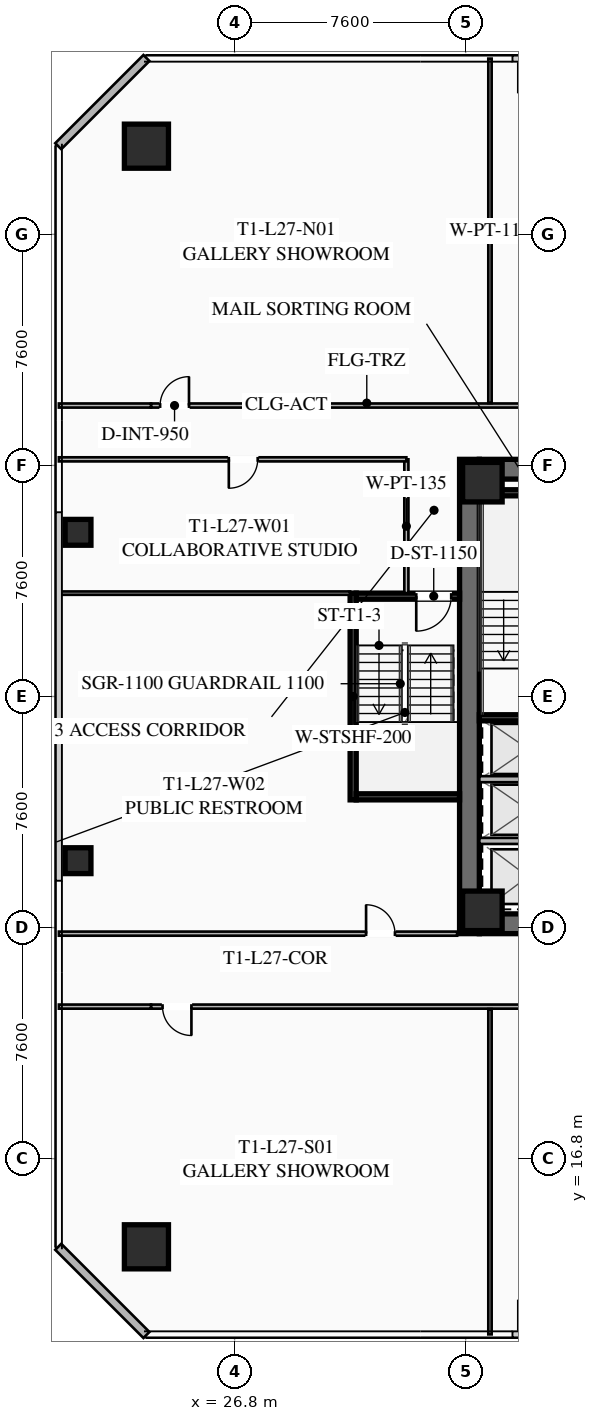
"""IFC4 building model, lengths in metres.
Left out: names, types, materials, properties, quantities, classifications, styles, units other than length and angle.
Written with IfcOpenShell. Run it as: python <this file> out.ifc"""

import sys

from ifc_helpers import new_model, si_unit, direction, frame, frame_2d, origin, origin_2d, place, context, subcontext, project, spatial, rectangle, hollow_rectangle, extrude, element, fill, save


model = new_model("IFC4")
c1 = context("Model", 3, precision=1e-05, world=origin(), true_north=direction((0.0, 1.0)))
c2 = subcontext(c1, "Body", "Model", "MODEL_VIEW")
j1 = project(units=[si_unit("LENGTHUNIT", "METRE"), si_unit("PLANEANGLEUNIT", "RADIAN")], contexts=[c1])
p1 = place(None, origin())
s1 = spatial("IfcSite", under=j1, at=p1, CompositionType="ELEMENT")
p2 = place(p1, origin())
s2 = spatial("IfcBuilding", under=s1, at=p2, CompositionType="ELEMENT")
p3 = place(p2, frame((0.0, 0.0, 102.7)))
s3 = spatial("IfcBuildingStorey", under=s2, at=p3, CompositionType="ELEMENT", Elevation=102.7)
p4 = place(p3, frame((34.525, 24.2, 0.0), z_axis=(0.0, 0.0, 1.0), x_axis=(0.0, 1.0, 0.0)))
e1 = element("IfcWall", 1, at=p4, inside=s3, PredefinedType="SHEAR", context=c2, shape_type="SweptSolid", body=[
    extrude(rectangle(XDim=15.6, YDim=0.65, at=frame_2d((7.8, 0.0))), origin(), (0.0, 0.0, 1.0), 3.55),
])
p5 = place(p3, frame((49.15, 24.525, 0.0), z_axis=(0.0, 0.0, 1.0), x_axis=(-1.0, 0.0, 0.0)))
e2 = element("IfcWall", 2, at=p5, inside=s3, PredefinedType="SHEAR", context=c2, shape_type="SweptSolid", body=[
    extrude(rectangle(XDim=14.3, YDim=0.65, at=frame_2d((7.15, 0.0))), origin(), (0.0, 0.0, 1.0), 3.55),
])
p6 = place(p5, frame((8.85, 0.0, 0.0)))
e3 = element("IfcOpeningElement", 3, at=p6, cuts=e2, PredefinedType="OPENING", context=c2, shape_type="SweptSolid", body=[
    extrude(rectangle(XDim=1.25, YDim=2.25, at=frame_2d((0.625, 1.125))), frame((0.0, 0.335, 0.0), z_axis=(0.0, -1.0, 0.0), x_axis=(1.0, 0.0, 0.0)), (0.0, 0.0, 1.0), 0.67),
])
p7 = place(p5, frame((3.8, 0.0, 0.0)))
e4 = element("IfcOpeningElement", 4, at=p7, cuts=e2, PredefinedType="OPENING", context=c2, shape_type="SweptSolid", body=[
    extrude(rectangle(XDim=1.25, YDim=2.25, at=frame_2d((0.625, 1.125))), frame((0.0, 0.335, 0.0), z_axis=(0.0, -1.0, 0.0), x_axis=(1.0, 0.0, 0.0)), (0.0, 0.0, 1.0), 0.67),
])
p8 = place(p3, frame((34.85, 39.475, 0.0), z_axis=(0.0, 0.0, 1.0), x_axis=(1.0, 0.0, 0.0)))
e5 = element("IfcWall", 5, at=p8, inside=s3, PredefinedType="SHEAR", context=c2, shape_type="SweptSolid", body=[
    extrude(rectangle(XDim=14.3, YDim=0.65, at=frame_2d((7.15, 0.0))), origin(), (0.0, 0.0, 1.0), 3.55),
])
p9 = place(p8, frame((4.2, 0.0, 0.0)))
e6 = element("IfcOpeningElement", 6, at=p9, cuts=e5, PredefinedType="OPENING", context=c2, shape_type="SweptSolid", body=[
    extrude(rectangle(XDim=1.25, YDim=2.25, at=frame_2d((0.625, 1.125))), frame((0.0, 0.335, 0.0), z_axis=(0.0, -1.0, 0.0), x_axis=(1.0, 0.0, 0.0)), (0.0, 0.0, 1.0), 0.67),
])
p10 = place(p8, frame((9.25, 0.0, 0.0)))
e7 = element("IfcOpeningElement", 7, at=p10, cuts=e5, PredefinedType="OPENING", context=c2, shape_type="SweptSolid", body=[
    extrude(rectangle(XDim=1.25, YDim=2.25, at=frame_2d((0.625, 1.125))), frame((0.0, 0.335, 0.0), z_axis=(0.0, -1.0, 0.0), x_axis=(1.0, 0.0, 0.0)), (0.0, 0.0, 1.0), 0.67),
])
for number, where, z_axis, x_axis in (
    (8, (34.95, 24.95, 0.0), (0.0, 0.0, 1.0), (1.0, 0.0, 0.0)),
    (9, (34.95, 39.05, 0.0), (0.0, 0.0, 1.0), (1.0, 0.0, 0.0)),
):
    element("IfcColumn", number, at=place(p3, frame(where, z_axis=z_axis, x_axis=x_axis)), inside=s3, PredefinedType="COLUMN", context=c2, shape_type="SweptSolid", body=[
        extrude(hollow_rectangle(XDim=1.3, YDim=1.3, WallThickness=0.05, at=origin_2d()), origin(), (0.0, 0.0, 1.0), 3.35),
    ])
for number, where, z_axis, x_axis in (
    (10, (23.9, 13.9, 0.0), (0.0, 0.0, 1.0), (1.0, 0.0, 0.0)),
    (11, (23.9, 50.1, 0.0), (0.0, 0.0, 1.0), (1.0, 0.0, 0.0)),
):
    element("IfcColumn", number, at=place(p3, frame(where, z_axis=z_axis, x_axis=x_axis)), inside=s3, PredefinedType="COLUMN", context=c2, shape_type="SweptSolid", body=[
        extrude(hollow_rectangle(XDim=1.45, YDim=1.45, WallThickness=0.055, at=origin_2d()), origin(), (0.0, 0.0, 1.0), 3.35),
    ])
for number, where, z_axis, x_axis in (
    (12, (21.65, 37.4, 0.0), (0.0, 0.0, 1.0), (1.0, 0.0, 0.0)),
    (13, (21.65, 26.6, 0.0), (0.0, 0.0, 1.0), (1.0, 0.0, 0.0)),
):
    element("IfcColumn", number, at=place(p3, frame(where, z_axis=z_axis, x_axis=x_axis)), inside=s3, PredefinedType="COLUMN", context=c2, shape_type="SweptSolid", body=[
        extrude(hollow_rectangle(XDim=0.85, YDim=0.85, WallThickness=0.035, at=origin_2d()), origin(), (0.0, 0.0, 1.0), 3.35),
    ])
for number, where, z_axis, x_axis in (
    (14, (23.9, 11.0, 0.0), (0.0, 0.0, 1.0), (-0.707, 0.707, 0.0)),
    (15, (21.0, 50.1, 0.0), (0.0, 0.0, 1.0), (0.707, 0.707, 0.0)),
):
    element("IfcWall", number, at=place(p3, frame(where, z_axis=z_axis, x_axis=x_axis)), inside=s3, PredefinedType="SOLIDWALL", context=c2, shape_type="SweptSolid", body=[
        extrude(rectangle(XDim=4.101, YDim=0.28, at=frame_2d((2.051, 0.0))), origin(), (0.0, 0.0, 1.0), 3.35),
    ])
for number, where, z_axis, x_axis in (
    (16, (34.85, 31.3, 0.0), (0.0, 0.0, 1.0), (1.0, 0.0, 0.0)),
    (17, (34.85, 38.7, 0.0), (0.0, 0.0, 1.0), (1.0, 0.0, 0.0)),
):
    element("IfcWall", number, at=place(p3, frame(where, z_axis=z_axis, x_axis=x_axis)), inside=s3, PredefinedType="SHEAR", context=c2, shape_type="SweptSolid", body=[
        extrude(rectangle(XDim=3.45, YDim=0.2, at=frame_2d((1.725, 0.0))), origin(), (0.0, 0.0, 1.0), 3.35),
    ])
for number, where, z_axis, x_axis in (
    (18, (34.85, 27.25, 0.0), (0.0, 0.0, 1.0), (1.0, 0.0, 0.0)),
    (19, (34.85, 29.28, 0.0), (0.0, 0.0, 1.0), (1.0, 0.0, 0.0)),
):
    element("IfcWall", number, at=place(p3, frame(where, z_axis=z_axis, x_axis=x_axis)), inside=s3, PredefinedType="SOLIDWALL", context=c2, shape_type="SweptSolid", body=[
        extrude(rectangle(XDim=3.1, YDim=0.2, at=frame_2d((1.55, 0.0))), origin(), (0.0, 0.0, 1.0), 3.35),
    ])
p11 = place(p3, frame((30.7, 28.6, 0.0), z_axis=(0.0, 0.0, 1.0), x_axis=(0.0, 1.0, 0.0)))
e20 = element("IfcWall", 20, at=p11, inside=s3, PredefinedType="SHEAR", context=c2, shape_type="SweptSolid", body=[
    extrude(rectangle(XDim=6.8, YDim=0.2, at=frame_2d((3.4, 0.0))), origin(), (0.0, 0.0, 1.0), 3.35),
])
p12 = place(p3, frame((34.2, 35.3, 0.0), z_axis=(0.0, 0.0, 1.0), x_axis=(-1.0, 0.0, 0.0)))
e21 = element("IfcWall", 21, at=p12, inside=s3, PredefinedType="SHEAR", context=c2, shape_type="SweptSolid", body=[
    extrude(rectangle(XDim=3.4, YDim=0.2, at=frame_2d((1.7, 0.0))), origin(), (0.0, 0.0, 1.0), 3.35),
])
p13 = place(p12, frame((0.275, 0.0, 0.0)))
e22 = element("IfcOpeningElement", 22, at=p13, cuts=e21, PredefinedType="OPENING", context=c2, shape_type="SweptSolid", body=[
    extrude(rectangle(XDim=1.15, YDim=2.2, at=frame_2d((0.575, 1.1))), frame((0.0, 0.11, 0.0), z_axis=(0.0, -1.0, 0.0), x_axis=(1.0, 0.0, 0.0)), (0.0, 0.0, 1.0), 0.22),
])
p14 = place(p3, frame((30.8, 28.7, 0.0), z_axis=(0.0, 0.0, 1.0), x_axis=(1.0, 0.0, 0.0)))
e23 = element("IfcWall", 23, at=p14, inside=s3, PredefinedType="SHEAR", context=c2, shape_type="SweptSolid", body=[
    extrude(rectangle(XDim=3.4, YDim=0.2, at=frame_2d((1.7, 0.0))), origin(), (0.0, 0.0, 1.0), 3.35),
])
p15 = place(p3, frame((32.45, 35.4, 0.0), z_axis=(0.0, 0.0, 1.0), x_axis=(0.0, 1.0, 0.0)))
e24 = element("IfcWall", 24, at=p15, inside=s3, PredefinedType="PARTITIONING", context=c2, shape_type="SweptSolid", body=[
    extrude(rectangle(XDim=4.4, YDim=0.135, at=frame_2d((2.2, 0.0))), origin(), (0.0, 0.0, 1.0), 2.703),
])
p16 = place(p3, frame((24.05, 41.57, 0.0), z_axis=(0.0, 0.0, 1.0), x_axis=(1.0, 0.0, 0.0)))
e25 = element("IfcWall", 25, at=p16, inside=s3, PredefinedType="PARTITIONING", context=c2, shape_type="SweptSolid", body=[
    extrude(rectangle(XDim=27.3, YDim=0.135, at=frame_2d((13.65, 0.0))), origin(), (0.0, 0.0, 1.0), 2.703),
])
p17 = place(p16, frame((0.3, 0.0, 0.0)))
e26 = element("IfcOpeningElement", 26, at=p17, cuts=e25, PredefinedType="OPENING", context=c2, shape_type="SweptSolid", body=[
    extrude(rectangle(XDim=0.95, YDim=2.05, at=frame_2d((0.475, 1.025))), frame((0.0, 0.077, 0.0), z_axis=(0.0, -1.0, 0.0), x_axis=(1.0, 0.0, 0.0)), (0.0, 0.0, 1.0), 0.155),
])
p18 = place(p16, frame((17.42, 0.0, 0.0)))
e27 = element("IfcOpeningElement", 27, at=p18, cuts=e25, PredefinedType="OPENING", context=c2, shape_type="SweptSolid", body=[
    extrude(rectangle(XDim=0.95, YDim=2.05, at=frame_2d((0.475, 1.025))), frame((0.0, 0.077, 0.0), z_axis=(0.0, -1.0, 0.0), x_axis=(1.0, 0.0, 0.0)), (0.0, 0.0, 1.0), 0.155),
])
p19 = place(p16, frame((21.437, 0.0, 0.0)))
e28 = element("IfcOpeningElement", 28, at=p19, cuts=e25, PredefinedType="OPENING", context=c2, shape_type="SweptSolid", body=[
    extrude(rectangle(XDim=0.95, YDim=2.05, at=frame_2d((0.475, 1.025))), frame((0.0, 0.077, 0.0), z_axis=(0.0, -1.0, 0.0), x_axis=(1.0, 0.0, 0.0)), (0.0, 0.0, 1.0), 0.155),
])
p20 = place(p3, frame((21.02, 41.57, 0.0), z_axis=(0.0, 0.0, 1.0), x_axis=(1.0, 0.0, 0.0)))
e29 = element("IfcWall", 29, at=p20, inside=s3, PredefinedType="PARTITIONING", context=c2, shape_type="SweptSolid", body=[
    extrude(rectangle(XDim=3.03, YDim=0.135, at=frame_2d((1.515, 0.0))), origin(), (0.0, 0.0, 1.0), 2.703),
])
p21 = place(p3, frame((35.2, 41.65, 0.0), z_axis=(0.0, 0.0, 1.0), x_axis=(0.0, 1.0, 0.0)))
e30 = element("IfcWall", 30, at=p21, inside=s3, PredefinedType="PARTITIONING", context=c2, shape_type="SweptSolid", body=[
    extrude(rectangle(XDim=11.33, YDim=0.11, at=frame_2d((5.665, 0.0))), origin(), (0.0, 0.0, 1.0), 2.703),
])
p22 = place(p3, frame((51.35, 21.8, 0.0), z_axis=(0.0, 0.0, 1.0), x_axis=(-1.0, 0.0, 0.0)))
e31 = element("IfcWall", 31, at=p22, inside=s3, PredefinedType="PARTITIONING", context=c2, shape_type="SweptSolid", body=[
    extrude(rectangle(XDim=27.3, YDim=0.135, at=frame_2d((13.65, 0.0))), origin(), (0.0, 0.0, 1.0), 2.703),
])
p23 = place(p22, frame((25.97, 0.0, 0.0)))
e32 = element("IfcOpeningElement", 32, at=p23, cuts=e31, PredefinedType="OPENING", context=c2, shape_type="SweptSolid", body=[
    extrude(rectangle(XDim=0.95, YDim=2.05, at=frame_2d((0.475, 1.025))), frame((0.0, 0.077, 0.0), z_axis=(0.0, -1.0, 0.0), x_axis=(1.0, 0.0, 0.0)), (0.0, 0.0, 1.0), 0.155),
])
p24 = place(p22, frame((8.59, 0.0, 0.0)))
e33 = element("IfcOpeningElement", 33, at=p24, cuts=e31, PredefinedType="OPENING", context=c2, shape_type="SweptSolid", body=[
    extrude(rectangle(XDim=0.95, YDim=2.05, at=frame_2d((0.475, 1.025))), frame((0.0, 0.077, 0.0), z_axis=(0.0, -1.0, 0.0), x_axis=(1.0, 0.0, 0.0)), (0.0, 0.0, 1.0), 0.155),
])
p25 = place(p22, frame((4.8, 0.0, 0.0)))
e34 = element("IfcOpeningElement", 34, at=p25, cuts=e31, PredefinedType="OPENING", context=c2, shape_type="SweptSolid", body=[
    extrude(rectangle(XDim=0.95, YDim=2.05, at=frame_2d((0.475, 1.025))), frame((0.0, 0.077, 0.0), z_axis=(0.0, -1.0, 0.0), x_axis=(1.0, 0.0, 0.0)), (0.0, 0.0, 1.0), 0.155),
])
p26 = place(p3, frame((21.02, 21.8, 0.0), z_axis=(0.0, 0.0, 1.0), x_axis=(1.0, 0.0, 0.0)))
e35 = element("IfcWall", 35, at=p26, inside=s3, PredefinedType="PARTITIONING", context=c2, shape_type="SweptSolid", body=[
    extrude(rectangle(XDim=3.03, YDim=0.135, at=frame_2d((1.515, 0.0))), origin(), (0.0, 0.0, 1.0), 2.703),
])
p27 = place(p3, frame((35.2, 11.02, 0.0), z_axis=(0.0, 0.0, 1.0), x_axis=(0.0, 1.0, 0.0)))
e36 = element("IfcWall", 36, at=p27, inside=s3, PredefinedType="PARTITIONING", context=c2, shape_type="SweptSolid", body=[
    extrude(rectangle(XDim=10.7, YDim=0.11, at=frame_2d((5.35, 0.0))), origin(), (0.0, 0.0, 1.0), 2.703),
])
p28 = place(p3, frame((32.45, 39.8, 0.0), z_axis=(0.0, 0.0, 1.0), x_axis=(-1.0, 0.0, 0.0)))
e37 = element("IfcWall", 37, at=p28, inside=s3, PredefinedType="PARTITIONING", context=c2, shape_type="SweptSolid", body=[
    extrude(rectangle(XDim=11.43, YDim=0.135, at=frame_2d((5.715, 0.0))), origin(), (0.0, 0.0, 1.0), 2.703),
])
p29 = place(p28, frame((4.89, 0.0, 0.0)))
e38 = element("IfcOpeningElement", 38, at=p29, cuts=e37, PredefinedType="OPENING", context=c2, shape_type="SweptSolid", body=[
    extrude(rectangle(XDim=0.95, YDim=2.05, at=frame_2d((0.475, 1.025))), frame((0.0, 0.077, 0.0), z_axis=(0.0, -1.0, 0.0), x_axis=(1.0, 0.0, 0.0)), (0.0, 0.0, 1.0), 0.155),
])
p30 = place(p3, frame((21.02, 24.2, 0.0), z_axis=(0.0, 0.0, 1.0), x_axis=(1.0, 0.0, 0.0)))
e39 = element("IfcWall", 39, at=p30, inside=s3, PredefinedType="PARTITIONING", context=c2, shape_type="SweptSolid", body=[
    extrude(rectangle(XDim=13.1, YDim=0.135, at=frame_2d((6.55, 0.0))), origin(), (0.0, 0.0, 1.0), 2.703),
])
p31 = place(p30, frame((10.105, 0.0, 0.0)))
e40 = element("IfcOpeningElement", 40, at=p31, cuts=e39, PredefinedType="OPENING", context=c2, shape_type="SweptSolid", body=[
    extrude(rectangle(XDim=0.95, YDim=2.05, at=frame_2d((0.475, 1.025))), frame((0.0, 0.077, 0.0), z_axis=(0.0, -1.0, 0.0), x_axis=(1.0, 0.0, 0.0)), (0.0, 0.0, 1.0), 0.155),
])
p32 = place(p3, frame((30.6, 35.4, 0.0), z_axis=(0.0, 0.0, 1.0), x_axis=(-1.0, 0.0, 0.0)))
e41 = element("IfcWall", 41, at=p32, inside=s3, PredefinedType="PARTITIONING", context=c2, shape_type="SweptSolid", body=[
    extrude(rectangle(XDim=9.58, YDim=0.11, at=frame_2d((4.79, 0.0))), origin(), (0.0, 0.0, 1.0), 2.703),
])
p33 = place(p13, origin())
e42 = element("IfcDoor", 42, at=p33, inside=s3, OperationType="SINGLE_SWING_RIGHT", PredefinedType="DOOR", context=c2, shape_type="SweptSolid", body=[
    extrude(rectangle(XDim=1.15, YDim=2.2, at=frame_2d((0.575, 1.1))), frame((0.0, 0.025, 0.0), z_axis=(0.0, -1.0, 0.0), x_axis=(1.0, 0.0, 0.0)), (0.0, 0.0, 1.0), 0.05),
])
fill(e22, e42)
p34 = place(p17, origin())
e43 = element("IfcDoor", 43, at=p34, inside=s3, OperationType="SINGLE_SWING_RIGHT", PredefinedType="DOOR", context=c2, shape_type="SweptSolid", body=[
    extrude(rectangle(XDim=0.95, YDim=2.05, at=frame_2d((0.475, 1.025))), frame((0.0, 0.025, 0.0), z_axis=(0.0, -1.0, 0.0), x_axis=(1.0, 0.0, 0.0)), (0.0, 0.0, 1.0), 0.05),
])
fill(e26, e43)
p35 = place(p23, origin())
e44 = element("IfcDoor", 44, at=p35, inside=s3, OperationType="SINGLE_SWING_LEFT", PredefinedType="DOOR", context=c2, shape_type="SweptSolid", body=[
    extrude(rectangle(XDim=0.95, YDim=2.05, at=frame_2d((0.475, 1.025))), frame((0.0, 0.025, 0.0), z_axis=(0.0, -1.0, 0.0), x_axis=(1.0, 0.0, 0.0)), (0.0, 0.0, 1.0), 0.05),
])
fill(e32, e44)
p36 = place(p29, origin())
e45 = element("IfcDoor", 45, at=p36, inside=s3, OperationType="SINGLE_SWING_RIGHT", PredefinedType="DOOR", context=c2, shape_type="SweptSolid", body=[
    extrude(rectangle(XDim=0.95, YDim=2.05, at=frame_2d((0.475, 1.025))), frame((0.0, 0.025, 0.0), z_axis=(0.0, -1.0, 0.0), x_axis=(1.0, 0.0, 0.0)), (0.0, 0.0, 1.0), 0.05),
])
fill(e38, e45)
p37 = place(p31, origin())
e46 = element("IfcDoor", 46, at=p37, inside=s3, OperationType="SINGLE_SWING_LEFT", PredefinedType="DOOR", context=c2, shape_type="SweptSolid", body=[
    extrude(rectangle(XDim=0.95, YDim=2.05, at=frame_2d((0.475, 1.025))), frame((0.0, 0.025, 0.0), z_axis=(0.0, -1.0, 0.0), x_axis=(1.0, 0.0, 0.0)), (0.0, 0.0, 1.0), 0.05),
])
fill(e40, e46)
save(model, sys.argv[1])
